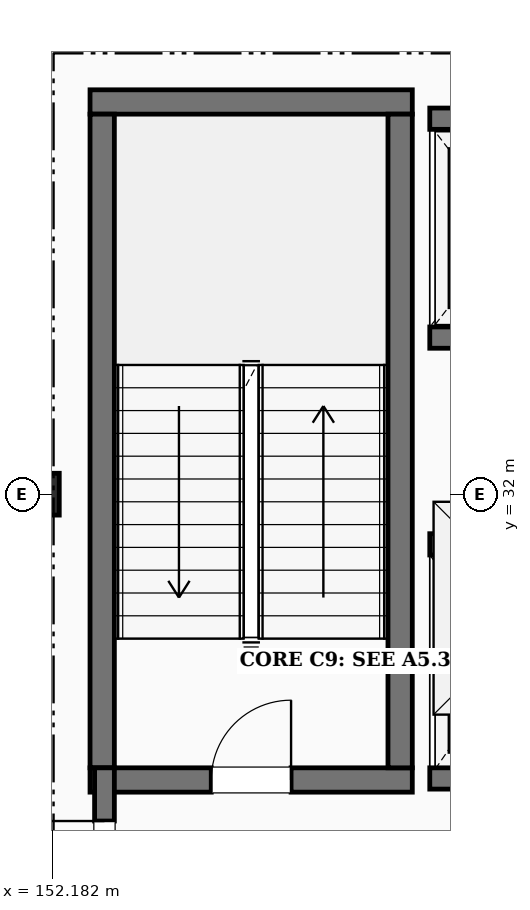
"""IFC4 building model, lengths in metres.
Left out: names, types, materials, properties, quantities, classifications, styles, units other than length and angle.
Written with IfcOpenShell. Run it as: python <this file> out.ifc"""

import sys

from ifc_helpers import new_model, si_unit, direction, frame, frame_2d, origin, origin_2d, place, context, subcontext, project, spatial, rectangle, extrude, element, fill, save


model = new_model("IFC4")
c1 = context("Model", 3, precision=1e-05, world=origin(), true_north=direction((0.0, 1.0)))
c2 = subcontext(c1, "Body", "Model", "MODEL_VIEW")
j1 = project(units=[si_unit("LENGTHUNIT", "METRE"), si_unit("PLANEANGLEUNIT", "RADIAN")], contexts=[c1])
p1 = place(None, origin())
s1 = spatial("IfcSite", under=j1, at=p1, CompositionType="ELEMENT")
p2 = place(p1, origin())
s2 = spatial("IfcBuilding", under=s1, at=p2, CompositionType="ELEMENT")
p3 = place(p2, frame((0.0, 0.0, 23.4)))
s3 = spatial("IfcBuildingStorey", under=s2, at=p3, CompositionType="ELEMENT", Elevation=23.4)
p4 = place(p3, frame((152.0, 32.0, 0.0), z_axis=(0.0, 0.0, 1.0), x_axis=(1.0, 0.0, 0.0)))
e1 = element("IfcColumn", 1, at=p4, inside=s3, PredefinedType="COLUMN", context=c2, shape_type="SweptSolid", body=[
    extrude(rectangle(XDim=0.55, YDim=0.55, at=origin_2d()), origin(), (0.0, 0.0, 1.0), 4.2),
])
p5 = place(p3, frame((152.68, 28.24, 0.0), z_axis=(0.0, 0.0, 1.0), x_axis=(1.0, 0.0, 0.0)))
e2 = element("IfcWall", 2, at=p5, inside=s3, PredefinedType="SHEAR", context=c2, shape_type="SweptSolid", body=[
    extrude(rectangle(XDim=4.24, YDim=0.32, at=frame_2d((2.12, 0.0))), origin(), (0.0, 0.0, 1.0), 4.2),
])
p6 = place(p5, frame((1.595, 0.0, 0.0)))
e3 = element("IfcOpeningElement", 3, at=p6, cuts=e2, PredefinedType="OPENING", context=c2, shape_type="SweptSolid", body=[
    extrude(rectangle(XDim=1.05, YDim=2.15, at=frame_2d((0.525, 1.075))), frame((0.0, 0.17, 0.0), z_axis=(0.0, -1.0, 0.0), x_axis=(1.0, 0.0, 0.0)), (0.0, 0.0, 1.0), 0.34),
])
p7 = place(p3, frame((152.68, 37.16, 0.0), z_axis=(0.0, 0.0, 1.0), x_axis=(1.0, 0.0, 0.0)))
e4 = element("IfcWall", 4, at=p7, inside=s3, PredefinedType="SHEAR", context=c2, shape_type="SweptSolid", body=[
    extrude(rectangle(XDim=4.24, YDim=0.32, at=frame_2d((2.12, 0.0))), origin(), (0.0, 0.0, 1.0), 4.2),
])
for number, where, z_axis, x_axis in (
    (5, (152.84, 28.4, 0.0), (0.0, 0.0, 1.0), (0.0, 1.0, 0.0)),
    (6, (156.76, 28.4, 0.0), (0.0, 0.0, 1.0), (0.0, 1.0, 0.0)),
):
    element("IfcWall", number, at=place(p3, frame(where, z_axis=z_axis, x_axis=x_axis)), inside=s3, PredefinedType="SHEAR", context=c2, shape_type="SweptSolid", body=[
        extrude(rectangle(XDim=8.6, YDim=0.32, at=frame_2d((4.3, 0.0))), origin(), (0.0, 0.0, 1.0), 4.2),
    ])
p8 = place(p3, frame((152.87, 24.54, 0.0), z_axis=(0.0, 0.0, 1.0), x_axis=(0.0, 1.0, 0.0)))
e7 = element("IfcWall", 7, at=p8, inside=s3, PredefinedType="SHEAR", context=c2, shape_type="SweptSolid", body=[
    extrude(rectangle(XDim=3.86, YDim=0.26, at=frame_2d((1.93, 0.0))), origin(), (0.0, 0.0, 1.0), 4.2),
])
p9 = place(p8, frame((1.46, 0.0, 0.0)))
e8 = element("IfcOpeningElement", 8, at=p9, cuts=e7, PredefinedType="OPENING", context=c2, shape_type="SweptSolid", body=[
    extrude(rectangle(XDim=1.7, YDim=2.2, at=frame_2d((0.85, 1.1))), frame((0.0, 0.14, 0.0), z_axis=(0.0, -1.0, 0.0), x_axis=(1.0, 0.0, 0.0)), (0.0, 0.0, 1.0), 0.28),
])
p10 = place(p3, frame((157.15, 28.26, 0.0), z_axis=(0.0, 0.0, 1.0), x_axis=(1.0, 0.0, 0.0)))
e9 = element("IfcWall", 9, at=p10, inside=s3, PredefinedType="SHEAR", context=c2, shape_type="SweptSolid", body=[
    extrude(rectangle(XDim=2.38, YDim=0.28, at=frame_2d((1.19, 0.0))), origin(), (0.0, 0.0, 1.0), 4.2),
])
p11 = place(p10, frame((0.615, 0.0, 0.0)))
e10 = element("IfcOpeningElement", 10, at=p11, cuts=e9, PredefinedType="OPENING", context=c2, shape_type="SweptSolid", body=[
    extrude(rectangle(XDim=1.15, YDim=2.2, at=frame_2d((0.575, 1.1))), frame((0.0, 0.15, 0.0), z_axis=(0.0, -1.0, 0.0), x_axis=(1.0, 0.0, 0.0)), (0.0, 0.0, 1.0), 0.3),
])
for number, where, z_axis, x_axis in (
    (11, (157.15, 31.34, 0.0), (0.0, 0.0, 1.0), (1.0, 0.0, 0.0)),
    (12, (157.15, 34.06, 0.0), (0.0, 0.0, 1.0), (1.0, 0.0, 0.0)),
):
    element("IfcWall", number, at=place(p3, frame(where, z_axis=z_axis, x_axis=x_axis)), inside=s3, PredefinedType="SHEAR", context=c2, shape_type="SweptSolid", body=[
        extrude(rectangle(XDim=2.38, YDim=0.28, at=frame_2d((1.19, 0.0))), origin(), (0.0, 0.0, 1.0), 4.2),
    ])
p12 = place(p3, frame((157.15, 36.94, 0.0), z_axis=(0.0, 0.0, 1.0), x_axis=(1.0, 0.0, 0.0)))
e13 = element("IfcWall", 13, at=p12, inside=s3, PredefinedType="SHEAR", context=c2, shape_type="SweptSolid", body=[
    extrude(rectangle(XDim=2.38, YDim=0.28, at=frame_2d((1.19, 0.0))), origin(), (0.0, 0.0, 1.0), 4.2),
])
p13 = place(p12, frame((0.69, 0.0, 0.0)))
e14 = element("IfcOpeningElement", 14, at=p13, cuts=e13, PredefinedType="OPENING", context=c2, shape_type="SweptSolid", body=[
    extrude(rectangle(XDim=1.0, YDim=2.15, at=frame_2d((0.5, 1.075))), frame((0.0, 0.15, 0.0), z_axis=(0.0, -1.0, 0.0), x_axis=(1.0, 0.0, 0.0)), (0.0, 0.0, 1.0), 0.3),
])
p14 = place(p2, frame((0.0, 0.0, 27.6)))
p15 = place(p14, frame((0.0, 0.0, 1.925)))
p16 = place(p15, frame((158.6, 30.5, 0.0)))
p17 = place(p16, frame((0.0, 0.0, 0.175)))
e15 = element("IfcWindow", 15, at=p17, inside=s3, PartitioningType="SINGLE_PANEL", PredefinedType="SKYLIGHT", context=c2, shape_type="SweptSolid", body=[
    extrude(rectangle(XDim=2.8, YDim=2.8, at=origin_2d()), origin(), (0.0, 0.0, 1.0), 0.05),
])
p18 = place(p6, origin())
e16 = element("IfcDoor", 16, at=p18, inside=s3, OperationType="SINGLE_SWING_RIGHT", PredefinedType="DOOR", context=c2, shape_type="SweptSolid", body=[
    extrude(rectangle(XDim=1.05, YDim=2.15, at=frame_2d((0.525, 1.075))), frame((0.0, 0.025, 0.0), z_axis=(0.0, -1.0, 0.0), x_axis=(1.0, 0.0, 0.0)), (0.0, 0.0, 1.0), 0.05),
])
fill(e3, e16)
p19 = place(p9, origin())
e17 = element("IfcDoor", 17, at=p19, inside=s3, OperationType="DOUBLE_DOOR_SINGLE_SWING", PredefinedType="DOOR", context=c2, shape_type="SweptSolid", body=[
    extrude(rectangle(XDim=1.7, YDim=2.2, at=frame_2d((0.85, 1.1))), frame((0.0, 0.025, 0.0), z_axis=(0.0, -1.0, 0.0), x_axis=(1.0, 0.0, 0.0)), (0.0, 0.0, 1.0), 0.05),
])
fill(e8, e17)
save(model, sys.argv[1])
